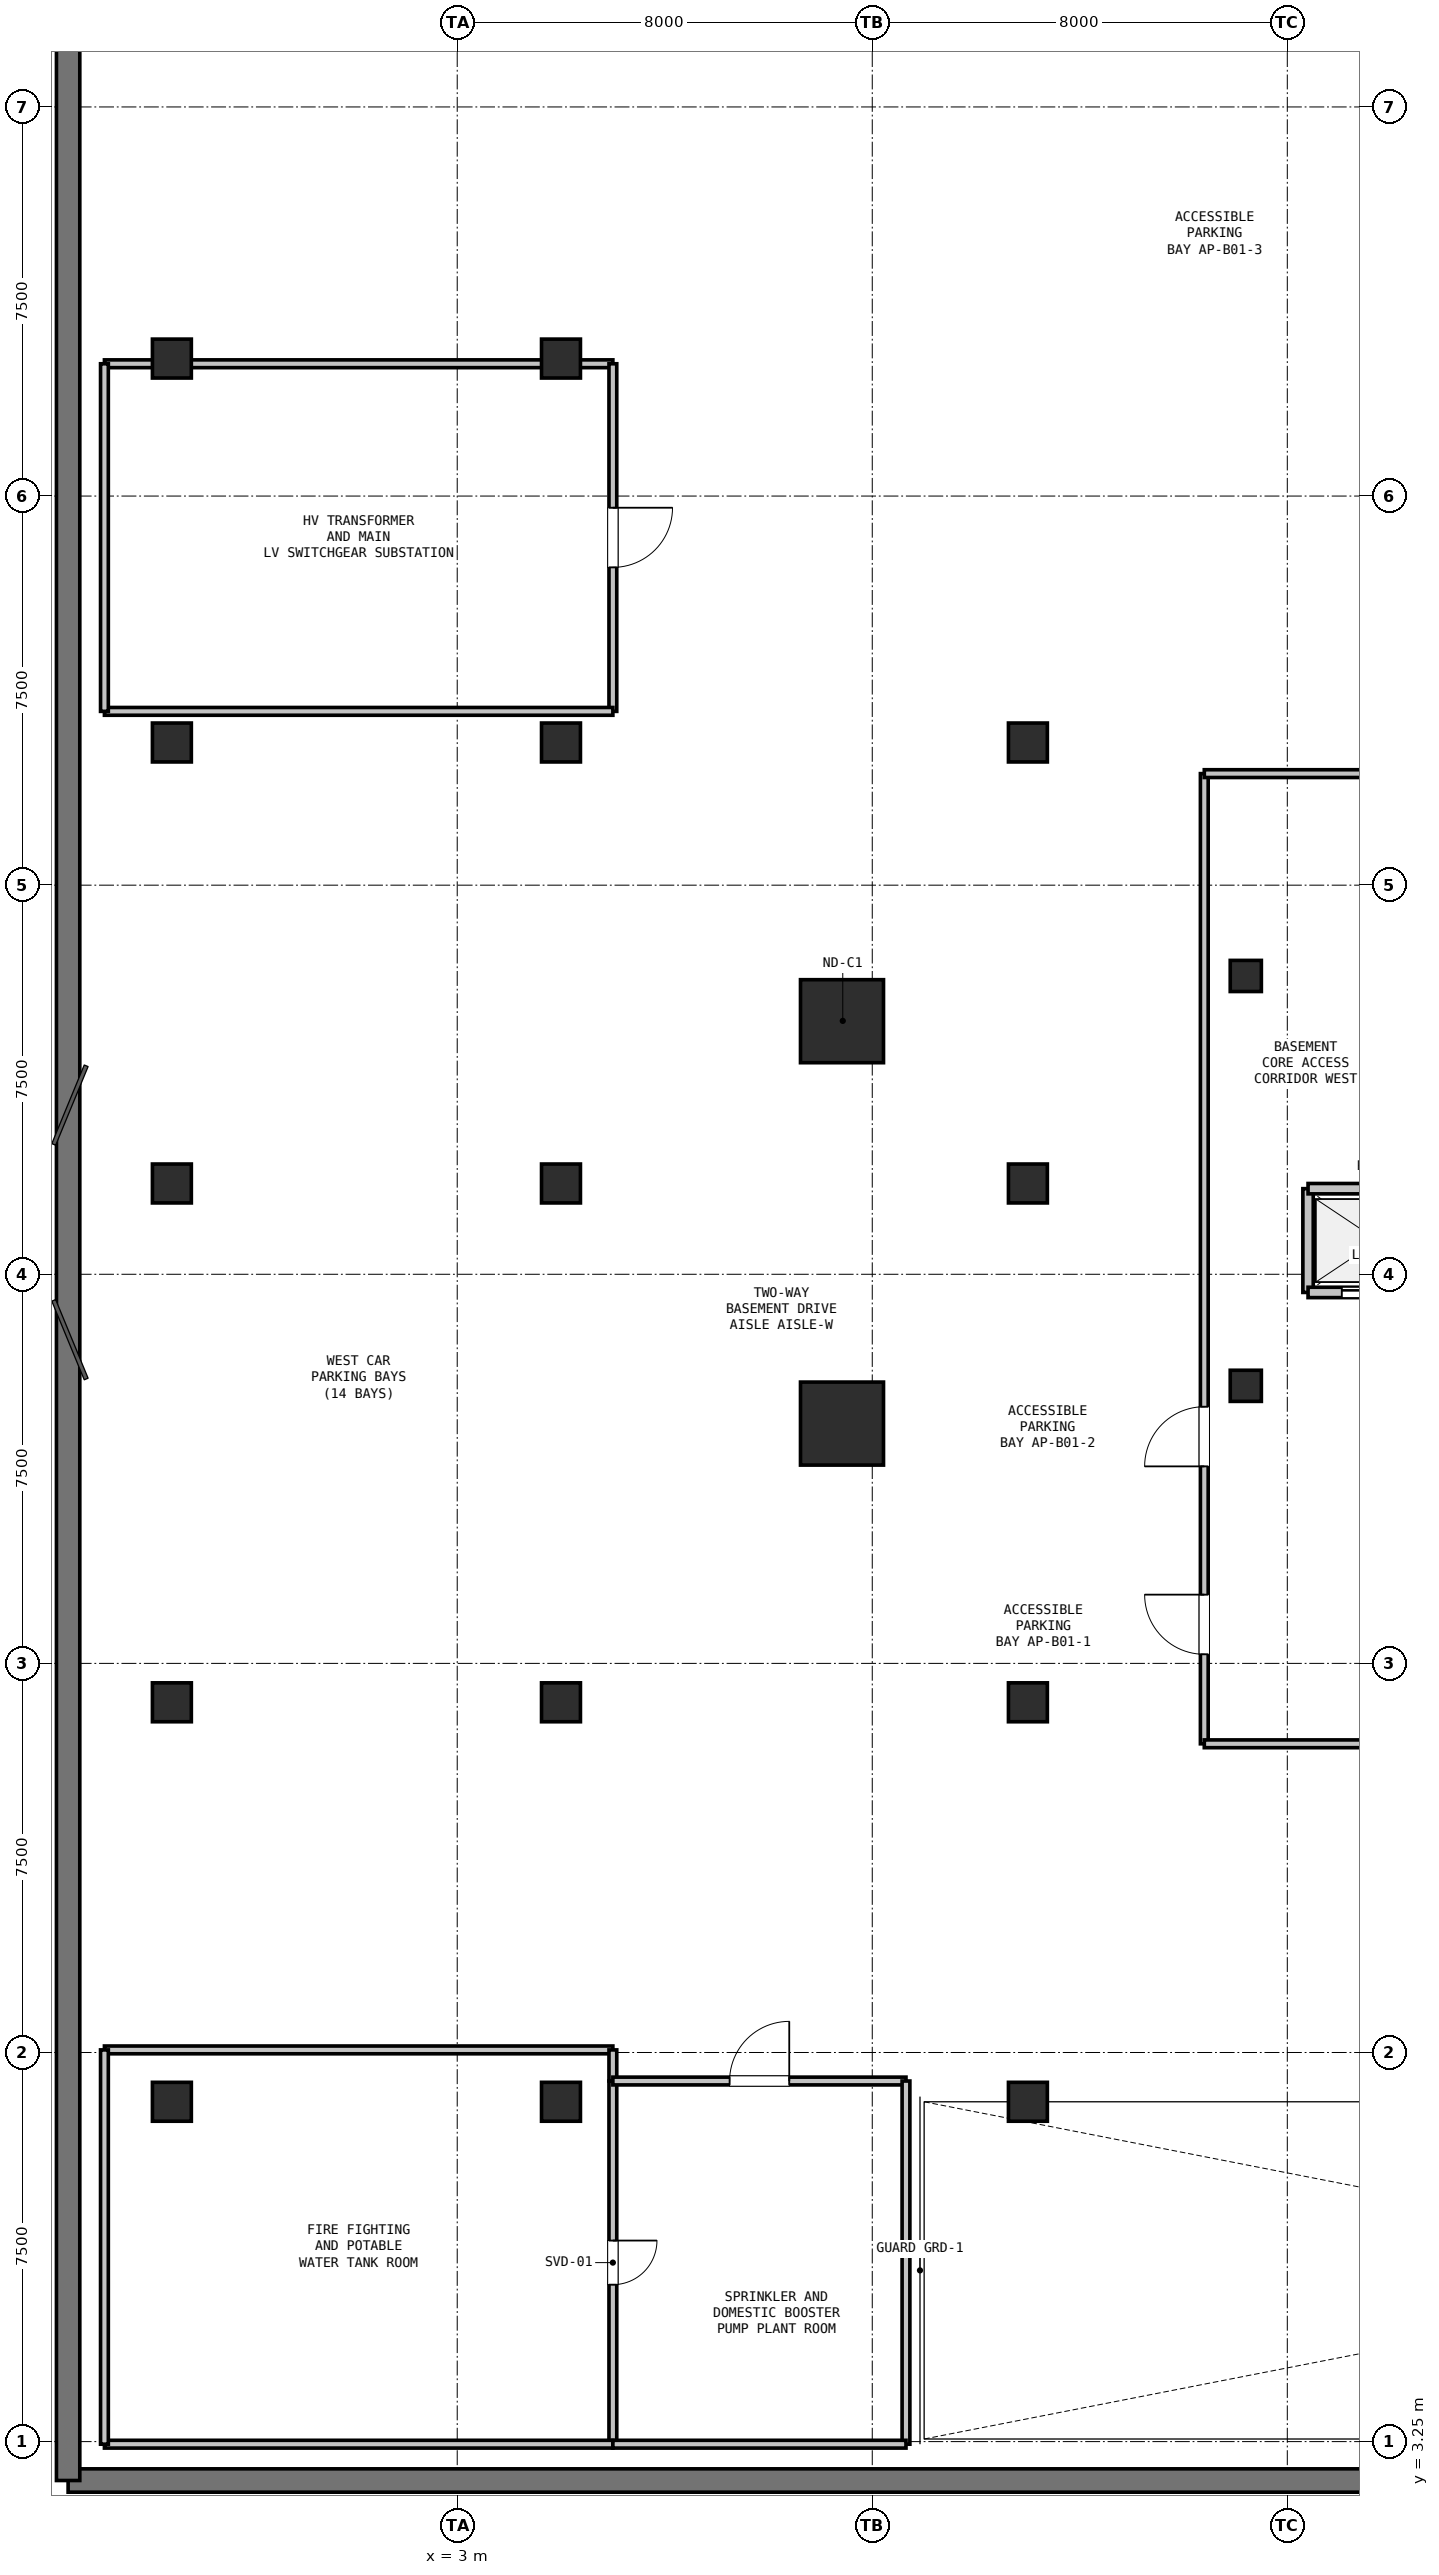
"""IFC4 building model, lengths in metres.
Left out: names, types, materials, properties, quantities, classifications, styles, units other than length and angle.
Written with IfcOpenShell. Run it as: python <this file> out.ifc"""

import sys

from ifc_helpers import new_model, si_unit, direction, frame, frame_2d, origin, origin_2d, place, context, subcontext, project, spatial, rectangle, hollow_rectangle, extrude, element, fill, save


model = new_model("IFC4")
c1 = context("Model", 3, precision=1e-05, world=origin(), true_north=direction((0.0, 1.0)))
c2 = subcontext(c1, "Body", "Model", "MODEL_VIEW")
j1 = project(units=[si_unit("LENGTHUNIT", "METRE"), si_unit("PLANEANGLEUNIT", "RADIAN")], contexts=[c1])
p1 = place(None, origin())
s1 = spatial("IfcSite", under=j1, at=p1, CompositionType="ELEMENT")
p2 = place(p1, origin())
s2 = spatial("IfcBuilding", under=s1, at=p2, CompositionType="ELEMENT")
p3 = place(p2, frame((0.0, 0.0, -4.5)))
s3 = spatial("IfcBuildingStorey", under=s2, at=p3, CompositionType="ELEMENT", Elevation=-4.5)
p4 = place(p3, frame((-4.5, 2.5, 0.0), z_axis=(0.0, 0.0, 1.0), x_axis=(1.0, 0.0, 0.0)))
e1 = element("IfcWall", 1, at=p4, inside=s3, PredefinedType="USERDEFINED", context=c2, shape_type="SweptSolid", body=[
    extrude(rectangle(XDim=81.5, YDim=0.45, at=frame_2d((40.75, 0.0))), origin(), (0.0, 0.0, 1.0), 4.5),
])
p5 = place(p3, frame((-4.5, 51.0, 0.0), z_axis=(0.0, 0.0, 1.0), x_axis=(0.0, -1.0, 0.0)))
e2 = element("IfcWall", 2, at=p5, inside=s3, PredefinedType="USERDEFINED", context=c2, shape_type="SweptSolid", body=[
    extrude(rectangle(XDim=48.5, YDim=0.45, at=frame_2d((24.25, 0.0))), origin(), (0.0, 0.0, 1.0), 4.5),
])
for number, where, z_axis, x_axis in (
    (3, (10.417, 30.628, 0.0), (0.0, 0.0, 1.0), (1.0, 0.0, 0.0)),
    (4, (10.417, 22.872, 0.0), (0.0, 0.0, 1.0), (1.0, 0.0, 0.0)),
):
    element("IfcColumn", number, at=place(p3, frame(where, z_axis=z_axis, x_axis=x_axis)), inside=s3, PredefinedType="COLUMN", context=c2, shape_type="SweptSolid", body=[
        extrude(hollow_rectangle(XDim=1.6, YDim=1.6, WallThickness=0.04, at=origin_2d()), origin(), (0.0, 0.0, 1.0), 4.5),
    ])
for number, where, z_axis, x_axis in (
    (5, (18.2, 23.6, 0.0), (0.0, 0.0, 1.0), (1.0, 0.0, 0.0)),
    (6, (18.2, 31.5, 0.0), (0.0, 0.0, 1.0), (1.0, 0.0, 0.0)),
):
    element("IfcColumn", number, at=place(p3, frame(where, z_axis=z_axis, x_axis=x_axis)), inside=s3, PredefinedType="COLUMN", context=c2, shape_type="SweptSolid", body=[
        extrude(rectangle(XDim=0.6, YDim=0.6, at=origin_2d()), origin(), (0.0, 0.0, 1.0), 4.5),
    ])
for number, where, z_axis, x_axis in (
    (7, (-2.5, 9.8, 0.0), (0.0, 0.0, 1.0), (1.0, 0.0, 0.0)),
    (8, (-2.5, 17.5, 0.0), (0.0, 0.0, 1.0), (1.0, 0.0, 0.0)),
    (9, (-2.5, 27.5, 0.0), (0.0, 0.0, 1.0), (1.0, 0.0, 0.0)),
    (10, (-2.5, 36.0, 0.0), (0.0, 0.0, 1.0), (1.0, 0.0, 0.0)),
    (11, (-2.5, 43.4, 0.0), (0.0, 0.0, 1.0), (1.0, 0.0, 0.0)),
    (12, (5.0, 9.8, 0.0), (0.0, 0.0, 1.0), (1.0, 0.0, 0.0)),
    (13, (5.0, 17.5, 0.0), (0.0, 0.0, 1.0), (1.0, 0.0, 0.0)),
    (14, (5.0, 27.5, 0.0), (0.0, 0.0, 1.0), (1.0, 0.0, 0.0)),
    (15, (5.0, 36.0, 0.0), (0.0, 0.0, 1.0), (1.0, 0.0, 0.0)),
    (16, (5.0, 43.4, 0.0), (0.0, 0.0, 1.0), (1.0, 0.0, 0.0)),
    (17, (14.0, 9.8, 0.0), (0.0, 0.0, 1.0), (1.0, 0.0, 0.0)),
    (18, (14.0, 17.5, 0.0), (0.0, 0.0, 1.0), (1.0, 0.0, 0.0)),
    (19, (14.0, 27.5, 0.0), (0.0, 0.0, 1.0), (1.0, 0.0, 0.0)),
    (20, (14.0, 36.0, 0.0), (0.0, 0.0, 1.0), (1.0, 0.0, 0.0)),
):
    element("IfcColumn", number, at=place(p3, frame(where, z_axis=z_axis, x_axis=x_axis)), inside=s3, PredefinedType="COLUMN", context=c2, shape_type="SweptSolid", body=[
        extrude(rectangle(XDim=0.75, YDim=0.75, at=origin_2d()), origin(), (0.0, 0.0, 1.0), 4.5),
    ])
p6 = place(p3, frame((19.4, 25.4, 0.0), z_axis=(0.0, 0.0, 1.0), x_axis=(0.0, 1.0, 0.0)))
e21 = element("IfcWall", 21, at=p6, inside=s3, PredefinedType="PARTITIONING", context=c2, shape_type="SweptSolid", body=[
    extrude(rectangle(XDim=2.0, YDim=0.2, at=frame_2d((1.0, 0.0))), origin(), (0.0, 0.0, 1.0), 4.2),
])
p7 = place(p3, frame((19.4, 27.4, 0.0), z_axis=(0.0, 0.0, 1.0), x_axis=(1.0, 0.0, 0.0)))
e22 = element("IfcWall", 22, at=p7, inside=s3, PredefinedType="PARTITIONING", context=c2, shape_type="SweptSolid", body=[
    extrude(rectangle(XDim=2.8, YDim=0.2, at=frame_2d((1.4, 0.0))), origin(), (0.0, 0.0, 1.0), 4.2),
])
p8 = place(p3, frame((22.2, 25.4, 0.0), z_axis=(0.0, 0.0, 1.0), x_axis=(-1.0, 0.0, 0.0)))
e23 = element("IfcWall", 23, at=p8, inside=s3, PredefinedType="PARTITIONING", context=c2, shape_type="SweptSolid", body=[
    extrude(rectangle(XDim=2.8, YDim=0.2, at=frame_2d((1.4, 0.0))), origin(), (0.0, 0.0, 1.0), 4.2),
])
p9 = place(p8, frame((0.85, 0.0, 0.0)))
e24 = element("IfcOpeningElement", 24, at=p9, cuts=e23, PredefinedType="OPENING", context=c2, shape_type="SweptSolid", body=[
    extrude(rectangle(XDim=1.3, YDim=2.2, at=frame_2d((0.65, 1.1))), frame((0.0, 0.11, 0.0), z_axis=(0.0, -1.0, 0.0), x_axis=(1.0, 0.0, 0.0)), (0.0, 0.0, 1.0), 0.22),
])
p10 = place(p3, frame((17.4, 16.7, 0.0), z_axis=(0.0, 0.0, 1.0), x_axis=(0.0, 1.0, 0.0)))
e25 = element("IfcWall", 25, at=p10, inside=s3, PredefinedType="PARTITIONING", context=c2, shape_type="SweptSolid", body=[
    extrude(rectangle(XDim=18.7, YDim=0.15, at=frame_2d((9.35, 0.0))), origin(), (0.0, 0.0, 1.0), 4.2),
])
p11 = place(p10, frame((1.725, 0.0, 0.0)))
e26 = element("IfcOpeningElement", 26, at=p11, cuts=e25, PredefinedType="OPENING", context=c2, shape_type="SweptSolid", body=[
    extrude(rectangle(XDim=1.15, YDim=2.15, at=frame_2d((0.575, 1.075))), frame((0.0, 0.085, 0.0), z_axis=(0.0, -1.0, 0.0), x_axis=(1.0, 0.0, 0.0)), (0.0, 0.0, 1.0), 0.17),
])
p12 = place(p10, frame((5.347, 0.0, 0.0)))
e27 = element("IfcOpeningElement", 27, at=p12, cuts=e25, PredefinedType="OPENING", context=c2, shape_type="SweptSolid", body=[
    extrude(rectangle(XDim=1.15, YDim=2.15, at=frame_2d((0.575, 1.075))), frame((0.0, 0.085, 0.0), z_axis=(0.0, -1.0, 0.0), x_axis=(1.0, 0.0, 0.0)), (0.0, 0.0, 1.0), 0.17),
])
p13 = place(p3, frame((17.4, 35.4, 0.0), z_axis=(0.0, 0.0, 1.0), x_axis=(1.0, 0.0, 0.0)))
e28 = element("IfcWall", 28, at=p13, inside=s3, PredefinedType="PARTITIONING", context=c2, shape_type="SweptSolid", body=[
    extrude(rectangle(XDim=4.8, YDim=0.15, at=frame_2d((2.4, 0.0))), origin(), (0.0, 0.0, 1.0), 4.2),
])
p14 = place(p3, frame((36.65, 16.7, 0.0), z_axis=(0.0, 0.0, 1.0), x_axis=(-1.0, 0.0, 0.0)))
e29 = element("IfcWall", 29, at=p14, inside=s3, PredefinedType="PARTITIONING", context=c2, shape_type="SweptSolid", body=[
    extrude(rectangle(XDim=19.25, YDim=0.15, at=frame_2d((9.625, 0.0))), origin(), (0.0, 0.0, 1.0), 4.2),
])
p15 = place(p14, frame((9.05, 0.0, 0.0)))
e30 = element("IfcOpeningElement", 30, at=p15, cuts=e29, PredefinedType="OPENING", context=c2, shape_type="SweptSolid", body=[
    extrude(rectangle(XDim=1.15, YDim=2.15, at=frame_2d((0.575, 1.075))), frame((0.0, 0.085, 0.0), z_axis=(0.0, -1.0, 0.0), x_axis=(1.0, 0.0, 0.0)), (0.0, 0.0, 1.0), 0.17),
])
p16 = place(p3, frame((-3.8, 10.8, 0.0), z_axis=(0.0, 0.0, 1.0), x_axis=(1.0, 0.0, 0.0)))
e31 = element("IfcWall", 31, at=p16, inside=s3, PredefinedType="PARTITIONING", context=c2, shape_type="SweptSolid", body=[
    extrude(rectangle(XDim=9.8, YDim=0.15, at=frame_2d((4.9, 0.0))), origin(), (0.0, 0.0, 1.0), 4.2),
])
p17 = place(p3, frame((6.0, 10.8, 0.0), z_axis=(0.0, 0.0, 1.0), x_axis=(0.0, -1.0, 0.0)))
e32 = element("IfcWall", 32, at=p17, inside=s3, PredefinedType="PARTITIONING", context=c2, shape_type="SweptSolid", body=[
    extrude(rectangle(XDim=0.6, YDim=0.15, at=frame_2d((0.3, 0.0))), origin(), (0.0, 0.0, 1.0), 4.2),
])
p18 = place(p3, frame((6.0, 10.2, 0.0), z_axis=(0.0, 0.0, 1.0), x_axis=(0.0, -1.0, 0.0)))
e33 = element("IfcWall", 33, at=p18, inside=s3, PredefinedType="PARTITIONING", context=c2, shape_type="SweptSolid", body=[
    extrude(rectangle(XDim=7.0, YDim=0.15, at=frame_2d((3.5, 0.0))), origin(), (0.0, 0.0, 1.0), 4.2),
])
p19 = place(p18, frame((3.075, 0.0, 0.0)))
e34 = element("IfcOpeningElement", 34, at=p19, cuts=e33, PredefinedType="OPENING", context=c2, shape_type="SweptSolid", body=[
    extrude(rectangle(XDim=0.85, YDim=2.1, at=frame_2d((0.425, 1.05))), frame((0.0, 0.085, 0.0), z_axis=(0.0, -1.0, 0.0), x_axis=(1.0, 0.0, 0.0)), (0.0, 0.0, 1.0), 0.17),
])
p20 = place(p3, frame((6.0, 3.2, 0.0), z_axis=(0.0, 0.0, 1.0), x_axis=(-1.0, 0.0, 0.0)))
e35 = element("IfcWall", 35, at=p20, inside=s3, PredefinedType="PARTITIONING", context=c2, shape_type="SweptSolid", body=[
    extrude(rectangle(XDim=9.8, YDim=0.15, at=frame_2d((4.9, 0.0))), origin(), (0.0, 0.0, 1.0), 4.2),
])
p21 = place(p3, frame((-3.8, 3.2, 0.0), z_axis=(0.0, 0.0, 1.0), x_axis=(0.0, 1.0, 0.0)))
e36 = element("IfcWall", 36, at=p21, inside=s3, PredefinedType="PARTITIONING", context=c2, shape_type="SweptSolid", body=[
    extrude(rectangle(XDim=7.6, YDim=0.15, at=frame_2d((3.8, 0.0))), origin(), (0.0, 0.0, 1.0), 4.2),
])
p22 = place(p3, frame((6.0, 10.2, 0.0), z_axis=(0.0, 0.0, 1.0), x_axis=(1.0, 0.0, 0.0)))
e37 = element("IfcWall", 37, at=p22, inside=s3, PredefinedType="PARTITIONING", context=c2, shape_type="SweptSolid", body=[
    extrude(rectangle(XDim=5.65, YDim=0.15, at=frame_2d((2.825, 0.0))), origin(), (0.0, 0.0, 1.0), 4.2),
])
p23 = place(p22, frame((2.25, 0.0, 0.0)))
e38 = element("IfcOpeningElement", 38, at=p23, cuts=e37, PredefinedType="OPENING", context=c2, shape_type="SweptSolid", body=[
    extrude(rectangle(XDim=1.15, YDim=2.15, at=frame_2d((0.575, 1.075))), frame((0.0, 0.085, 0.0), z_axis=(0.0, -1.0, 0.0), x_axis=(1.0, 0.0, 0.0)), (0.0, 0.0, 1.0), 0.17),
])
p24 = place(p3, frame((11.65, 10.2, 0.0), z_axis=(0.0, 0.0, 1.0), x_axis=(0.0, -1.0, 0.0)))
e39 = element("IfcWall", 39, at=p24, inside=s3, PredefinedType="PARTITIONING", context=c2, shape_type="SweptSolid", body=[
    extrude(rectangle(XDim=7.0, YDim=0.15, at=frame_2d((3.5, 0.0))), origin(), (0.0, 0.0, 1.0), 4.2),
])
p25 = place(p3, frame((11.65, 3.2, 0.0), z_axis=(0.0, 0.0, 1.0), x_axis=(-1.0, 0.0, 0.0)))
e40 = element("IfcWall", 40, at=p25, inside=s3, PredefinedType="PARTITIONING", context=c2, shape_type="SweptSolid", body=[
    extrude(rectangle(XDim=5.65, YDim=0.15, at=frame_2d((2.825, 0.0))), origin(), (0.0, 0.0, 1.0), 4.2),
])
p26 = place(p3, frame((-3.8, 43.3, 0.0), z_axis=(0.0, 0.0, 1.0), x_axis=(1.0, 0.0, 0.0)))
e41 = element("IfcWall", 41, at=p26, inside=s3, PredefinedType="PARTITIONING", context=c2, shape_type="SweptSolid", body=[
    extrude(rectangle(XDim=9.8, YDim=0.15, at=frame_2d((4.9, 0.0))), origin(), (0.0, 0.0, 1.0), 4.2),
])
p27 = place(p3, frame((6.0, 43.3, 0.0), z_axis=(0.0, 0.0, 1.0), x_axis=(0.0, -1.0, 0.0)))
e42 = element("IfcWall", 42, at=p27, inside=s3, PredefinedType="PARTITIONING", context=c2, shape_type="SweptSolid", body=[
    extrude(rectangle(XDim=6.7, YDim=0.15, at=frame_2d((3.35, 0.0))), origin(), (0.0, 0.0, 1.0), 4.2),
])
p28 = place(p27, frame((2.775, 0.0, 0.0)))
e43 = element("IfcOpeningElement", 43, at=p28, cuts=e42, PredefinedType="OPENING", context=c2, shape_type="SweptSolid", body=[
    extrude(rectangle(XDim=1.15, YDim=2.15, at=frame_2d((0.575, 1.075))), frame((0.0, 0.085, 0.0), z_axis=(0.0, -1.0, 0.0), x_axis=(1.0, 0.0, 0.0)), (0.0, 0.0, 1.0), 0.17),
])
p29 = place(p3, frame((6.0, 36.6, 0.0), z_axis=(0.0, 0.0, 1.0), x_axis=(-1.0, 0.0, 0.0)))
e44 = element("IfcWall", 44, at=p29, inside=s3, PredefinedType="PARTITIONING", context=c2, shape_type="SweptSolid", body=[
    extrude(rectangle(XDim=9.8, YDim=0.15, at=frame_2d((4.9, 0.0))), origin(), (0.0, 0.0, 1.0), 4.2),
])
p30 = place(p3, frame((-3.8, 36.6, 0.0), z_axis=(0.0, 0.0, 1.0), x_axis=(0.0, 1.0, 0.0)))
e45 = element("IfcWall", 45, at=p30, inside=s3, PredefinedType="PARTITIONING", context=c2, shape_type="SweptSolid", body=[
    extrude(rectangle(XDim=6.7, YDim=0.15, at=frame_2d((3.35, 0.0))), origin(), (0.0, 0.0, 1.0), 4.2),
])
p31 = place(p9, origin())
e46 = element("IfcDoor", 46, at=p31, inside=s3, OperationType="SLIDING_TO_LEFT", PredefinedType="DOOR", context=c2, shape_type="SweptSolid", body=[
    extrude(rectangle(XDim=1.3, YDim=2.2, at=frame_2d((0.65, 1.1))), frame((0.0, 0.025, 0.0), z_axis=(0.0, -1.0, 0.0), x_axis=(1.0, 0.0, 0.0)), (0.0, 0.0, 1.0), 0.05),
])
fill(e24, e46)
p32 = place(p11, origin())
e47 = element("IfcDoor", 47, at=p32, inside=s3, OperationType="SINGLE_SWING_RIGHT", PredefinedType="DOOR", context=c2, shape_type="SweptSolid", body=[
    extrude(rectangle(XDim=1.15, YDim=2.15, at=frame_2d((0.575, 1.075))), frame((0.0, 0.025, 0.0), z_axis=(0.0, -1.0, 0.0), x_axis=(1.0, 0.0, 0.0)), (0.0, 0.0, 1.0), 0.05),
])
fill(e26, e47)
p33 = place(p12, origin())
e48 = element("IfcDoor", 48, at=p33, inside=s3, OperationType="SINGLE_SWING_LEFT", PredefinedType="DOOR", context=c2, shape_type="SweptSolid", body=[
    extrude(rectangle(XDim=1.15, YDim=2.15, at=frame_2d((0.575, 1.075))), frame((0.0, 0.025, 0.0), z_axis=(0.0, -1.0, 0.0), x_axis=(1.0, 0.0, 0.0)), (0.0, 0.0, 1.0), 0.05),
])
fill(e27, e48)
p34 = place(p23, origin())
e49 = element("IfcDoor", 49, at=p34, inside=s3, OperationType="SINGLE_SWING_RIGHT", PredefinedType="DOOR", context=c2, shape_type="SweptSolid", body=[
    extrude(rectangle(XDim=1.15, YDim=2.15, at=frame_2d((0.575, 1.075))), frame((0.0, 0.025, 0.0), z_axis=(0.0, -1.0, 0.0), x_axis=(1.0, 0.0, 0.0)), (0.0, 0.0, 1.0), 0.05),
])
fill(e38, e49)
p35 = place(p28, origin())
e50 = element("IfcDoor", 50, at=p35, inside=s3, OperationType="SINGLE_SWING_LEFT", PredefinedType="DOOR", context=c2, shape_type="SweptSolid", body=[
    extrude(rectangle(XDim=1.15, YDim=2.15, at=frame_2d((0.575, 1.075))), frame((0.0, 0.025, 0.0), z_axis=(0.0, -1.0, 0.0), x_axis=(1.0, 0.0, 0.0)), (0.0, 0.0, 1.0), 0.05),
])
fill(e43, e50)
p36 = place(p19, origin())
e51 = element("IfcDoor", 51, at=p36, inside=s3, OperationType="SINGLE_SWING_LEFT", PredefinedType="DOOR", context=c2, shape_type="SweptSolid", body=[
    extrude(rectangle(XDim=0.85, YDim=2.1, at=frame_2d((0.425, 1.05))), frame((0.0, 0.025, 0.0), z_axis=(0.0, -1.0, 0.0), x_axis=(1.0, 0.0, 0.0)), (0.0, 0.0, 1.0), 0.05),
])
fill(e34, e51)
save(model, sys.argv[1])
